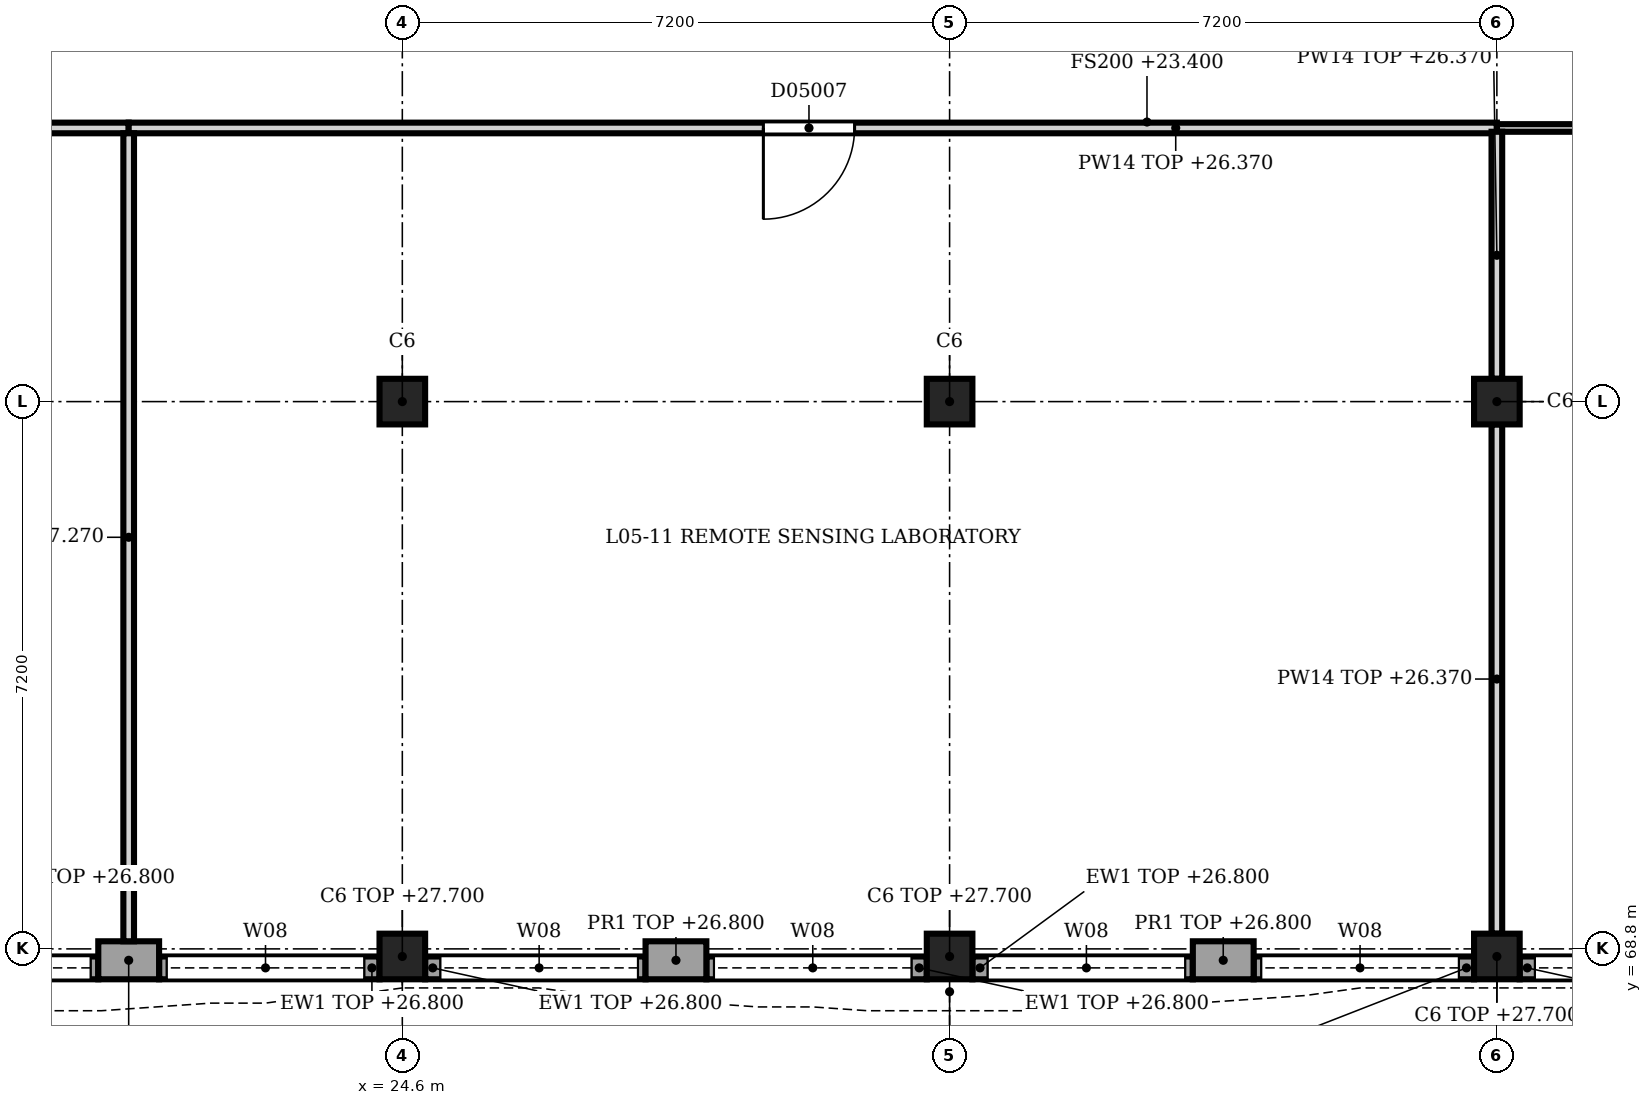
"""IFC4 building model, lengths in metres.
Left out: names, types, materials, properties, quantities, classifications, styles, units other than length and angle.
Written with IfcOpenShell. Run it as: python <this file> out.ifc"""

import sys

from ifc_helpers import new_model, si_unit, direction, frame, frame_2d, origin, origin_2d, place, context, subcontext, project, spatial, rectangle, extrude, element, fill, save


model = new_model("IFC4")
c1 = context("Model", 3, precision=1e-05, world=origin(), true_north=direction((0.0, 1.0)))
c2 = subcontext(c1, "Body", "Model", "MODEL_VIEW")
j1 = project(units=[si_unit("LENGTHUNIT", "METRE"), si_unit("PLANEANGLEUNIT", "RADIAN")], contexts=[c1])
p1 = place(None, origin())
s1 = spatial("IfcSite", under=j1, at=p1, CompositionType="ELEMENT")
p2 = place(p1, origin())
s2 = spatial("IfcBuilding", under=s1, at=p2, CompositionType="ELEMENT")
p3 = place(p2, frame((0.0, 0.0, 23.4)))
s3 = spatial("IfcBuildingStorey", under=s2, at=p3, CompositionType="ELEMENT", Elevation=23.4)
p4 = place(p3, frame((24.6, 68.7, 0.0), z_axis=(0.0, 0.0, 1.0), x_axis=(1.0, 0.0, 0.0)))
e1 = element("IfcColumn", 1, at=p4, inside=s3, PredefinedType="COLUMN", context=c2, shape_type="SweptSolid", body=[
    extrude(rectangle(XDim=0.6, YDim=0.6, at=origin_2d()), origin(), (0.0, 0.0, 1.0), 4.3),
])
p5 = place(p3, frame((24.6, 76.0, 0.0), z_axis=(0.0, 0.0, 1.0), x_axis=(1.0, 0.0, 0.0)))
e2 = element("IfcColumn", 2, at=p5, inside=s3, PredefinedType="COLUMN", context=c2, shape_type="SweptSolid", body=[
    extrude(rectangle(XDim=0.6, YDim=0.6, at=origin_2d()), origin(), (0.0, 0.0, 1.0), 4.5),
])
p6 = place(p3, frame((31.8, 68.7, 0.0), z_axis=(0.0, 0.0, 1.0), x_axis=(1.0, 0.0, 0.0)))
e3 = element("IfcColumn", 3, at=p6, inside=s3, PredefinedType="COLUMN", context=c2, shape_type="SweptSolid", body=[
    extrude(rectangle(XDim=0.6, YDim=0.6, at=origin_2d()), origin(), (0.0, 0.0, 1.0), 4.3),
])
p7 = place(p3, frame((31.8, 76.0, 0.0), z_axis=(0.0, 0.0, 1.0), x_axis=(1.0, 0.0, 0.0)))
e4 = element("IfcColumn", 4, at=p7, inside=s3, PredefinedType="COLUMN", context=c2, shape_type="SweptSolid", body=[
    extrude(rectangle(XDim=0.6, YDim=0.6, at=origin_2d()), origin(), (0.0, 0.0, 1.0), 4.5),
])
p8 = place(p3, frame((39.0, 68.7, 0.0), z_axis=(0.0, 0.0, 1.0), x_axis=(1.0, 0.0, 0.0)))
e5 = element("IfcColumn", 5, at=p8, inside=s3, PredefinedType="COLUMN", context=c2, shape_type="SweptSolid", body=[
    extrude(rectangle(XDim=0.6, YDim=0.6, at=origin_2d()), origin(), (0.0, 0.0, 1.0), 4.3),
])
p9 = place(p3, frame((39.0, 76.0, 0.0), z_axis=(0.0, 0.0, 1.0), x_axis=(1.0, 0.0, 0.0)))
e6 = element("IfcColumn", 6, at=p9, inside=s3, PredefinedType="COLUMN", context=c2, shape_type="SweptSolid", body=[
    extrude(rectangle(XDim=0.6, YDim=0.6, at=origin_2d()), origin(), (0.0, 0.0, 1.0), 4.5),
])
for number, where, z_axis, x_axis in (
    (7, (35.8, 68.65, 0.0), (0.0, 0.0, 1.0), (-1.0, 0.0, 0.0)),
    (8, (28.6, 68.65, 0.0), (0.0, 0.0, 1.0), (-1.0, 0.0, 0.0)),
):
    element("IfcWall", number, at=place(p3, frame(where, z_axis=z_axis, x_axis=x_axis)), inside=s3, PredefinedType="SOLIDWALL", context=c2, shape_type="SweptSolid", body=[
        extrude(rectangle(XDim=0.8, YDim=0.5, at=frame_2d((0.4, 0.0))), origin(), (0.0, 0.0, 1.0), 3.4),
    ])
p10 = place(p3, frame((21.4, 68.65, 0.0), z_axis=(0.0, 0.0, 1.0), x_axis=(-1.0, 0.0, 0.0)))
e9 = element("IfcWall", 9, at=p10, inside=s3, PredefinedType="SOLIDWALL", context=c2, shape_type="SweptSolid", body=[
    extrude(rectangle(XDim=0.8, YDim=0.5, at=frame_2d((0.4, 0.0))), origin(), (0.0, 0.0, 1.0), 3.4),
])
p11 = place(p3, frame((42.2, 68.55, 0.0), z_axis=(0.0, 0.0, 1.0), x_axis=(-1.0, 0.0, 0.0)))
e10 = element("IfcWall", 10, at=p11, inside=s3, PredefinedType="SOLIDWALL", context=c2, shape_type="SweptSolid", body=[
    extrude(rectangle(XDim=2.9, YDim=0.3, at=frame_2d((1.45, 0.0))), origin(), (0.0, 0.0, 1.0), 3.4),
])
p12 = place(p11, frame((0.1, 0.0, 1.2)))
e11 = element("IfcOpeningElement", 11, at=p12, cuts=e10, PredefinedType="OPENING", context=c2, shape_type="SweptSolid", body=[
    extrude(rectangle(XDim=2.6, YDim=2.1, at=frame_2d((1.3, 1.05))), frame((0.0, 0.16, 0.0), z_axis=(0.0, -1.0, 0.0), x_axis=(1.0, 0.0, 0.0)), (0.0, 0.0, 1.0), 0.32),
])
p13 = place(p3, frame((38.7, 68.55, 0.0), z_axis=(0.0, 0.0, 1.0), x_axis=(-1.0, 0.0, 0.0)))
e12 = element("IfcWall", 12, at=p13, inside=s3, PredefinedType="SOLIDWALL", context=c2, shape_type="SweptSolid", body=[
    extrude(rectangle(XDim=2.9, YDim=0.3, at=frame_2d((1.45, 0.0))), origin(), (0.0, 0.0, 1.0), 3.4),
])
p14 = place(p13, frame((0.2, 0.0, 1.2)))
e13 = element("IfcOpeningElement", 13, at=p14, cuts=e12, PredefinedType="OPENING", context=c2, shape_type="SweptSolid", body=[
    extrude(rectangle(XDim=2.6, YDim=2.1, at=frame_2d((1.3, 1.05))), frame((0.0, 0.16, 0.0), z_axis=(0.0, -1.0, 0.0), x_axis=(1.0, 0.0, 0.0)), (0.0, 0.0, 1.0), 0.32),
])
p15 = place(p3, frame((35.0, 68.55, 0.0), z_axis=(0.0, 0.0, 1.0), x_axis=(-1.0, 0.0, 0.0)))
e14 = element("IfcWall", 14, at=p15, inside=s3, PredefinedType="SOLIDWALL", context=c2, shape_type="SweptSolid", body=[
    extrude(rectangle(XDim=2.9, YDim=0.3, at=frame_2d((1.45, 0.0))), origin(), (0.0, 0.0, 1.0), 3.4),
])
p16 = place(p15, frame((0.1, 0.0, 1.2)))
e15 = element("IfcOpeningElement", 15, at=p16, cuts=e14, PredefinedType="OPENING", context=c2, shape_type="SweptSolid", body=[
    extrude(rectangle(XDim=2.6, YDim=2.1, at=frame_2d((1.3, 1.05))), frame((0.0, 0.16, 0.0), z_axis=(0.0, -1.0, 0.0), x_axis=(1.0, 0.0, 0.0)), (0.0, 0.0, 1.0), 0.32),
])
p17 = place(p3, frame((31.5, 68.55, 0.0), z_axis=(0.0, 0.0, 1.0), x_axis=(-1.0, 0.0, 0.0)))
e16 = element("IfcWall", 16, at=p17, inside=s3, PredefinedType="SOLIDWALL", context=c2, shape_type="SweptSolid", body=[
    extrude(rectangle(XDim=2.9, YDim=0.3, at=frame_2d((1.45, 0.0))), origin(), (0.0, 0.0, 1.0), 3.4),
])
p18 = place(p17, frame((0.2, 0.0, 1.2)))
e17 = element("IfcOpeningElement", 17, at=p18, cuts=e16, PredefinedType="OPENING", context=c2, shape_type="SweptSolid", body=[
    extrude(rectangle(XDim=2.6, YDim=2.1, at=frame_2d((1.3, 1.05))), frame((0.0, 0.16, 0.0), z_axis=(0.0, -1.0, 0.0), x_axis=(1.0, 0.0, 0.0)), (0.0, 0.0, 1.0), 0.32),
])
p19 = place(p3, frame((27.8, 68.55, 0.0), z_axis=(0.0, 0.0, 1.0), x_axis=(-1.0, 0.0, 0.0)))
e18 = element("IfcWall", 18, at=p19, inside=s3, PredefinedType="SOLIDWALL", context=c2, shape_type="SweptSolid", body=[
    extrude(rectangle(XDim=2.9, YDim=0.3, at=frame_2d((1.45, 0.0))), origin(), (0.0, 0.0, 1.0), 3.4),
])
p20 = place(p19, frame((0.1, 0.0, 1.2)))
e19 = element("IfcOpeningElement", 19, at=p20, cuts=e18, PredefinedType="OPENING", context=c2, shape_type="SweptSolid", body=[
    extrude(rectangle(XDim=2.6, YDim=2.1, at=frame_2d((1.3, 1.05))), frame((0.0, 0.16, 0.0), z_axis=(0.0, -1.0, 0.0), x_axis=(1.0, 0.0, 0.0)), (0.0, 0.0, 1.0), 0.32),
])
p21 = place(p3, frame((24.3, 68.55, 0.0), z_axis=(0.0, 0.0, 1.0), x_axis=(-1.0, 0.0, 0.0)))
e20 = element("IfcWall", 20, at=p21, inside=s3, PredefinedType="SOLIDWALL", context=c2, shape_type="SweptSolid", body=[
    extrude(rectangle(XDim=2.9, YDim=0.3, at=frame_2d((1.45, 0.0))), origin(), (0.0, 0.0, 1.0), 3.4),
])
p22 = place(p21, frame((0.2, 0.0, 1.2)))
e21 = element("IfcOpeningElement", 21, at=p22, cuts=e20, PredefinedType="OPENING", context=c2, shape_type="SweptSolid", body=[
    extrude(rectangle(XDim=2.6, YDim=2.1, at=frame_2d((1.3, 1.05))), frame((0.0, 0.16, 0.0), z_axis=(0.0, -1.0, 0.0), x_axis=(1.0, 0.0, 0.0)), (0.0, 0.0, 1.0), 0.32),
])
p23 = place(p3, frame((20.6, 68.55, 0.0), z_axis=(0.0, 0.0, 1.0), x_axis=(-1.0, 0.0, 0.0)))
e22 = element("IfcWall", 22, at=p23, inside=s3, PredefinedType="SOLIDWALL", context=c2, shape_type="SweptSolid", body=[
    extrude(rectangle(XDim=2.9, YDim=0.3, at=frame_2d((1.45, 0.0))), origin(), (0.0, 0.0, 1.0), 3.4),
])
p24 = place(p23, frame((0.1, 0.0, 1.2)))
e23 = element("IfcOpeningElement", 23, at=p24, cuts=e22, PredefinedType="OPENING", context=c2, shape_type="SweptSolid", body=[
    extrude(rectangle(XDim=2.6, YDim=2.1, at=frame_2d((1.3, 1.05))), frame((0.0, 0.16, 0.0), z_axis=(0.0, -1.0, 0.0), x_axis=(1.0, 0.0, 0.0)), (0.0, 0.0, 1.0), 0.32),
])
p25 = place(p3, frame((21.0, 79.6, 0.0), z_axis=(0.0, 0.0, 1.0), x_axis=(-1.0, 0.0, 0.0)))
e24 = element("IfcWall", 24, at=p25, inside=s3, PredefinedType="PARTITIONING", context=c2, shape_type="SweptSolid", body=[
    extrude(rectangle(XDim=17.9, YDim=0.14, at=frame_2d((8.95, 0.0))), origin(), (0.0, 0.0, 1.0), 2.97),
])
p26 = place(p25, frame((8.45, 0.0, 0.0)))
e25 = element("IfcOpeningElement", 25, at=p26, cuts=e24, PredefinedType="OPENING", context=c2, shape_type="SweptSolid", body=[
    extrude(rectangle(XDim=1.2, YDim=2.1, at=frame_2d((0.6, 1.05))), frame((0.0, 0.08, 0.0), z_axis=(0.0, -1.0, 0.0), x_axis=(1.0, 0.0, 0.0)), (0.0, 0.0, 1.0), 0.16),
])
p27 = place(p3, frame((39.0, 79.6, 0.0), z_axis=(0.0, 0.0, 1.0), x_axis=(-1.0, 0.0, 0.0)))
e26 = element("IfcWall", 26, at=p27, inside=s3, PredefinedType="PARTITIONING", context=c2, shape_type="SweptSolid", body=[
    extrude(rectangle(XDim=18.0, YDim=0.14, at=frame_2d((9.0, 0.0))), origin(), (0.0, 0.0, 1.0), 2.97),
])
p28 = place(p27, frame((8.45, 0.0, 0.0)))
e27 = element("IfcOpeningElement", 27, at=p28, cuts=e26, PredefinedType="OPENING", context=c2, shape_type="SweptSolid", body=[
    extrude(rectangle(XDim=1.2, YDim=2.1, at=frame_2d((0.6, 1.05))), frame((0.0, 0.08, 0.0), z_axis=(0.0, -1.0, 0.0), x_axis=(1.0, 0.0, 0.0)), (0.0, 0.0, 1.0), 0.16),
])
p29 = place(p3, frame((53.4, 79.6, 0.0), z_axis=(0.0, 0.0, 1.0), x_axis=(-1.0, 0.0, 0.0)))
e28 = element("IfcWall", 28, at=p29, inside=s3, PredefinedType="PARTITIONING", context=c2, shape_type="SweptSolid", body=[
    extrude(rectangle(XDim=14.4, YDim=0.1, at=frame_2d((7.2, 0.0))), origin(), (0.0, 0.0, 1.0), 2.97),
])
p30 = place(p29, frame((6.75, 0.0, 0.0)))
e29 = element("IfcOpeningElement", 29, at=p30, cuts=e28, PredefinedType="OPENING", context=c2, shape_type="SweptSolid", body=[
    extrude(rectangle(XDim=1.0, YDim=2.1, at=frame_2d((0.5, 1.05))), frame((0.0, 0.06, 0.0), z_axis=(0.0, -1.0, 0.0), x_axis=(1.0, 0.0, 0.0)), (0.0, 0.0, 1.0), 0.12),
])
p31 = place(p3, frame((21.0, 68.9, 0.0), z_axis=(0.0, 0.0, 1.0), x_axis=(0.0, 1.0, 0.0)))
e30 = element("IfcWall", 30, at=p31, inside=s3, PredefinedType="PARTITIONING", context=c2, shape_type="SweptSolid", body=[
    extrude(rectangle(XDim=10.63, YDim=0.14, at=frame_2d((5.315, 0.0))), origin(), (0.0, 0.0, 1.0), 3.87),
])
p32 = place(p3, frame((39.0, 69.0, 0.0), z_axis=(0.0, 0.0, 1.0), x_axis=(0.0, 1.0, 0.0)))
e31 = element("IfcWall", 31, at=p32, inside=s3, PredefinedType="PARTITIONING", context=c2, shape_type="SweptSolid", body=[
    extrude(rectangle(XDim=6.7, YDim=0.14, at=frame_2d((3.35, 0.0))), origin(), (0.0, 0.0, 1.0), 2.97),
])
p33 = place(p3, frame((39.0, 76.3, 0.0), z_axis=(0.0, 0.0, 1.0), x_axis=(0.0, 1.0, 0.0)))
e32 = element("IfcWall", 32, at=p33, inside=s3, PredefinedType="PARTITIONING", context=c2, shape_type="SweptSolid", body=[
    extrude(rectangle(XDim=3.25, YDim=0.14, at=frame_2d((1.625, 0.0))), origin(), (0.0, 0.0, 1.0), 2.97),
])
p34 = place(p12, origin())
e33 = element("IfcWindow", 33, at=p34, inside=s3, PartitioningType="SINGLE_PANEL", PredefinedType="WINDOW", context=c2, shape_type="SweptSolid", body=[
    extrude(rectangle(XDim=2.6, YDim=2.1, at=frame_2d((1.3, 1.05))), frame((0.0, 0.03, 0.0), z_axis=(0.0, -1.0, 0.0), x_axis=(1.0, 0.0, 0.0)), (0.0, 0.0, 1.0), 0.06),
])
fill(e11, e33)
p35 = place(p14, origin())
e34 = element("IfcWindow", 34, at=p35, inside=s3, PartitioningType="SINGLE_PANEL", PredefinedType="WINDOW", context=c2, shape_type="SweptSolid", body=[
    extrude(rectangle(XDim=2.6, YDim=2.1, at=frame_2d((1.3, 1.05))), frame((0.0, 0.03, 0.0), z_axis=(0.0, -1.0, 0.0), x_axis=(1.0, 0.0, 0.0)), (0.0, 0.0, 1.0), 0.06),
])
fill(e13, e34)
p36 = place(p16, origin())
e35 = element("IfcWindow", 35, at=p36, inside=s3, PartitioningType="SINGLE_PANEL", PredefinedType="WINDOW", context=c2, shape_type="SweptSolid", body=[
    extrude(rectangle(XDim=2.6, YDim=2.1, at=frame_2d((1.3, 1.05))), frame((0.0, 0.03, 0.0), z_axis=(0.0, -1.0, 0.0), x_axis=(1.0, 0.0, 0.0)), (0.0, 0.0, 1.0), 0.06),
])
fill(e15, e35)
p37 = place(p18, origin())
e36 = element("IfcWindow", 36, at=p37, inside=s3, PartitioningType="SINGLE_PANEL", PredefinedType="WINDOW", context=c2, shape_type="SweptSolid", body=[
    extrude(rectangle(XDim=2.6, YDim=2.1, at=frame_2d((1.3, 1.05))), frame((0.0, 0.03, 0.0), z_axis=(0.0, -1.0, 0.0), x_axis=(1.0, 0.0, 0.0)), (0.0, 0.0, 1.0), 0.06),
])
fill(e17, e36)
p38 = place(p20, origin())
e37 = element("IfcWindow", 37, at=p38, inside=s3, PartitioningType="SINGLE_PANEL", PredefinedType="WINDOW", context=c2, shape_type="SweptSolid", body=[
    extrude(rectangle(XDim=2.6, YDim=2.1, at=frame_2d((1.3, 1.05))), frame((0.0, 0.03, 0.0), z_axis=(0.0, -1.0, 0.0), x_axis=(1.0, 0.0, 0.0)), (0.0, 0.0, 1.0), 0.06),
])
fill(e19, e37)
p39 = place(p22, origin())
e38 = element("IfcWindow", 38, at=p39, inside=s3, PartitioningType="SINGLE_PANEL", PredefinedType="WINDOW", context=c2, shape_type="SweptSolid", body=[
    extrude(rectangle(XDim=2.6, YDim=2.1, at=frame_2d((1.3, 1.05))), frame((0.0, 0.03, 0.0), z_axis=(0.0, -1.0, 0.0), x_axis=(1.0, 0.0, 0.0)), (0.0, 0.0, 1.0), 0.06),
])
fill(e21, e38)
p40 = place(p24, origin())
e39 = element("IfcWindow", 39, at=p40, inside=s3, PartitioningType="SINGLE_PANEL", PredefinedType="WINDOW", context=c2, shape_type="SweptSolid", body=[
    extrude(rectangle(XDim=2.6, YDim=2.1, at=frame_2d((1.3, 1.05))), frame((0.0, 0.03, 0.0), z_axis=(0.0, -1.0, 0.0), x_axis=(1.0, 0.0, 0.0)), (0.0, 0.0, 1.0), 0.06),
])
fill(e23, e39)
p41 = place(p28, origin())
e40 = element("IfcDoor", 40, at=p41, inside=s3, OperationType="SINGLE_SWING_RIGHT", PredefinedType="DOOR", context=c2, shape_type="SweptSolid", body=[
    extrude(rectangle(XDim=1.2, YDim=2.1, at=frame_2d((0.6, 1.05))), frame((0.0, 0.025, 0.0), z_axis=(0.0, -1.0, 0.0), x_axis=(1.0, 0.0, 0.0)), (0.0, 0.0, 1.0), 0.05),
])
fill(e27, e40)
save(model, sys.argv[1])
